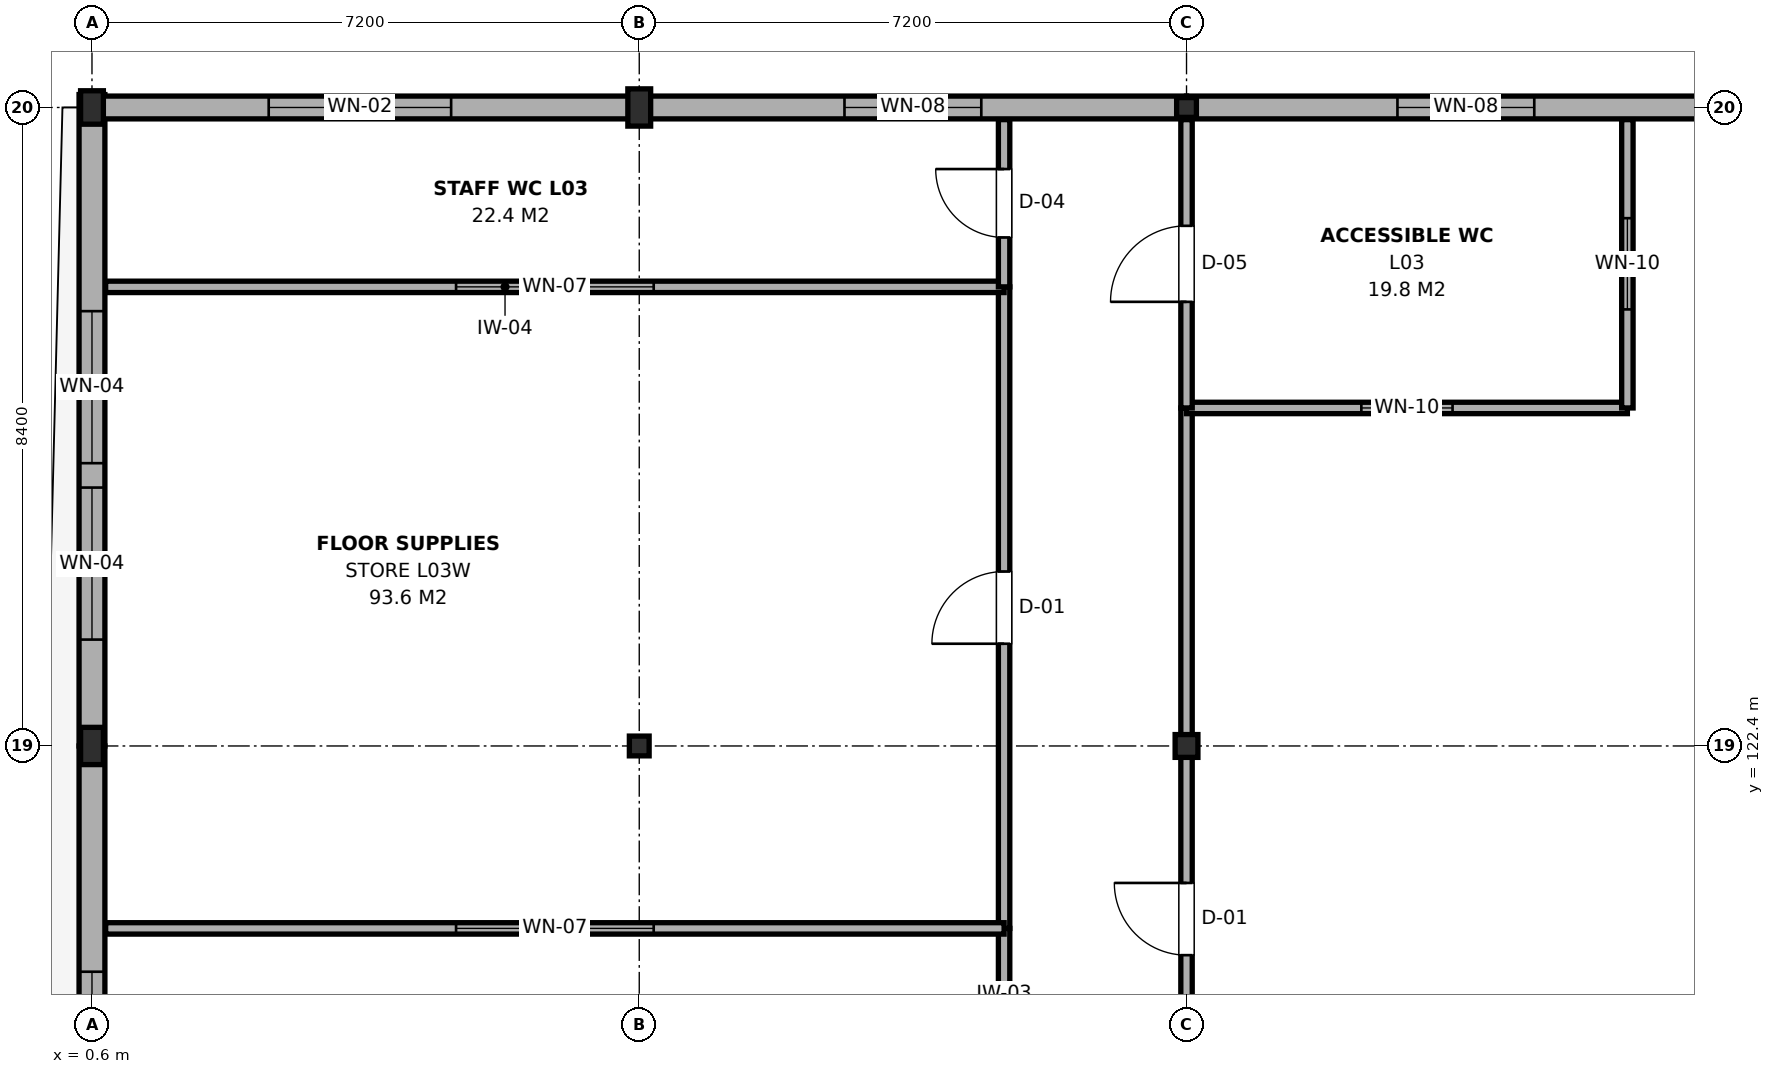
"""IFC4 building model, lengths in metres.
Left out: names, types, materials, properties, quantities, classifications, styles, units other than length and angle.
Written with IfcOpenShell. Run it as: python <this file> out.ifc"""

import sys

from ifc_helpers import new_model, si_unit, direction, frame, frame_2d, origin, origin_2d, place, context, subcontext, project, spatial, rectangle, i_section, extrude, element, fill, save


model = new_model("IFC4")
c1 = context("Model", 3, precision=1e-05, world=origin(), true_north=direction((0.0, 1.0)))
c2 = subcontext(c1, "Body", "Model", "MODEL_VIEW")
j1 = project(units=[si_unit("LENGTHUNIT", "METRE"), si_unit("PLANEANGLEUNIT", "RADIAN")], contexts=[c1])
p1 = place(None, origin())
s1 = spatial("IfcSite", under=j1, at=p1, CompositionType="ELEMENT")
p2 = place(p1, origin())
s2 = spatial("IfcBuilding", under=s1, at=p2, CompositionType="ELEMENT")
p3 = place(p2, frame((0.0, 0.0, 13.2)))
s3 = spatial("IfcBuildingStorey", under=s2, at=p3, CompositionType="ELEMENT", Elevation=13.2)
p4 = place(p3, frame((0.6, 122.4, 0.0), z_axis=(0.0, 0.0, 1.0), x_axis=(1.0, 0.0, 0.0)))
e1 = element("IfcColumn", 1, at=p4, inside=s3, PredefinedType="COLUMN", context=c2, shape_type="SweptSolid", body=[
    extrude(i_section(OverallWidth=0.3, OverallDepth=0.49, WebThickness=0.012, FlangeThickness=0.023, FilletRadius=0.027, at=origin_2d()), origin(), (0.0, 0.0, 1.0), 3.9),
])
p5 = place(p3, frame((0.6, 130.8, 0.0), z_axis=(0.0, 0.0, 1.0), x_axis=(1.0, 0.0, 0.0)))
e2 = element("IfcColumn", 2, at=p5, inside=s3, PredefinedType="COLUMN", context=c2, shape_type="SweptSolid", body=[
    extrude(i_section(OverallWidth=0.3, OverallDepth=0.44, WebThickness=0.011, FlangeThickness=0.021, FilletRadius=0.027, at=origin_2d()), origin(), (0.0, 0.0, 1.0), 3.9),
])
p6 = place(p3, frame((7.8, 122.4, 0.0), z_axis=(0.0, 0.0, 1.0), x_axis=(1.0, 0.0, 0.0)))
e3 = element("IfcColumn", 3, at=p6, inside=s3, PredefinedType="COLUMN", context=c2, shape_type="SweptSolid", body=[
    extrude(i_section(OverallWidth=0.26, OverallDepth=0.26, WebThickness=0.01, FlangeThickness=0.018, FilletRadius=0.024, at=origin_2d()), origin(), (0.0, 0.0, 1.0), 3.9),
])
p7 = place(p3, frame((7.8, 130.8, 0.0), z_axis=(0.0, 0.0, 1.0), x_axis=(1.0, 0.0, 0.0)))
e4 = element("IfcColumn", 4, at=p7, inside=s3, PredefinedType="COLUMN", context=c2, shape_type="SweptSolid", body=[
    extrude(i_section(OverallWidth=0.3, OverallDepth=0.49, WebThickness=0.012, FlangeThickness=0.023, FilletRadius=0.027, at=origin_2d()), origin(), (0.0, 0.0, 1.0), 3.9),
])
p8 = place(p3, frame((15.0, 122.4, 0.0), z_axis=(0.0, 0.0, 1.0), x_axis=(1.0, 0.0, 0.0)))
e5 = element("IfcColumn", 5, at=p8, inside=s3, PredefinedType="COLUMN", context=c2, shape_type="SweptSolid", body=[
    extrude(i_section(OverallWidth=0.3, OverallDepth=0.3, WebThickness=0.011, FlangeThickness=0.019, FilletRadius=0.027, at=origin_2d()), origin(), (0.0, 0.0, 1.0), 3.9),
])
p9 = place(p3, frame((15.0, 130.8, 0.0), z_axis=(0.0, 0.0, 1.0), x_axis=(1.0, 0.0, 0.0)))
e6 = element("IfcColumn", 6, at=p9, inside=s3, PredefinedType="COLUMN", context=c2, shape_type="SweptSolid", body=[
    extrude(i_section(OverallWidth=0.26, OverallDepth=0.26, WebThickness=0.01, FlangeThickness=0.018, FilletRadius=0.024, at=origin_2d()), origin(), (0.0, 0.0, 1.0), 3.9),
])
p10 = place(p3, frame((0.6, 113.4, 0.0), z_axis=(0.0, 0.0, 1.0), x_axis=(0.0, 1.0, 0.0)))
e7 = element("IfcWall", 7, at=p10, inside=s3, PredefinedType="SOLIDWALL", context=c2, shape_type="SweptSolid", body=[
    extrude(rectangle(XDim=9.0, YDim=0.34, at=frame_2d((4.5, 0.0))), origin(), (0.0, 0.0, 1.0), 3.105),
])
p11 = place(p10, frame((1.52, 0.0, 0.9)))
e8 = element("IfcOpeningElement", 8, at=p11, cuts=e7, PredefinedType="OPENING", context=c2, shape_type="SweptSolid", body=[
    extrude(rectangle(XDim=2.0, YDim=1.8, at=frame_2d((1.0, 0.9))), frame((0.0, 0.185, 0.0), z_axis=(0.0, -1.0, 0.0), x_axis=(1.0, 0.0, 0.0)), (0.0, 0.0, 1.0), 0.37),
])
p12 = place(p10, frame((4.03, 0.0, 0.9)))
e9 = element("IfcOpeningElement", 9, at=p12, cuts=e7, PredefinedType="OPENING", context=c2, shape_type="SweptSolid", body=[
    extrude(rectangle(XDim=2.0, YDim=1.8, at=frame_2d((1.0, 0.9))), frame((0.0, 0.185, 0.0), z_axis=(0.0, -1.0, 0.0), x_axis=(1.0, 0.0, 0.0)), (0.0, 0.0, 1.0), 0.37),
])
p13 = place(p3, frame((0.6, 122.4, 0.0), z_axis=(0.0, 0.0, 1.0), x_axis=(0.0, 1.0, 0.0)))
e10 = element("IfcWall", 10, at=p13, inside=s3, PredefinedType="SOLIDWALL", context=c2, shape_type="SweptSolid", body=[
    extrude(rectangle(XDim=8.57, YDim=0.34, at=frame_2d((4.285, 0.0))), origin(), (0.0, 0.0, 1.0), 3.105),
])
p14 = place(p13, frame((1.4, 0.0, 0.9)))
e11 = element("IfcOpeningElement", 11, at=p14, cuts=e10, PredefinedType="OPENING", context=c2, shape_type="SweptSolid", body=[
    extrude(rectangle(XDim=2.0, YDim=1.8, at=frame_2d((1.0, 0.9))), frame((0.0, 0.185, 0.0), z_axis=(0.0, -1.0, 0.0), x_axis=(1.0, 0.0, 0.0)), (0.0, 0.0, 1.0), 0.37),
])
p15 = place(p13, frame((3.72, 0.0, 0.9)))
e12 = element("IfcOpeningElement", 12, at=p15, cuts=e10, PredefinedType="OPENING", context=c2, shape_type="SweptSolid", body=[
    extrude(rectangle(XDim=2.0, YDim=1.8, at=frame_2d((1.0, 0.9))), frame((0.0, 0.185, 0.0), z_axis=(0.0, -1.0, 0.0), x_axis=(1.0, 0.0, 0.0)), (0.0, 0.0, 1.0), 0.37),
])
p16 = place(p3, frame((0.45, 130.8, 0.0), z_axis=(0.0, 0.0, 1.0), x_axis=(1.0, 0.0, 0.0)))
e13 = element("IfcWall", 13, at=p16, inside=s3, PredefinedType="SOLIDWALL", context=c2, shape_type="SweptSolid", body=[
    extrude(rectangle(XDim=7.35, YDim=0.3, at=frame_2d((3.675, 0.0))), origin(), (0.0, 0.0, 1.0), 3.345),
])
p17 = place(p16, frame((2.475, 0.0, 0.9)))
e14 = element("IfcOpeningElement", 14, at=p17, cuts=e13, PredefinedType="OPENING", context=c2, shape_type="SweptSolid", body=[
    extrude(rectangle(XDim=2.4, YDim=2.1, at=frame_2d((1.2, 1.05))), frame((0.0, 0.165, 0.0), z_axis=(0.0, -1.0, 0.0), x_axis=(1.0, 0.0, 0.0)), (0.0, 0.0, 1.0), 0.33),
])
p18 = place(p3, frame((7.8, 130.8, 0.0), z_axis=(0.0, 0.0, 1.0), x_axis=(1.0, 0.0, 0.0)))
e15 = element("IfcWall", 15, at=p18, inside=s3, PredefinedType="SOLIDWALL", context=c2, shape_type="SweptSolid", body=[
    extrude(rectangle(XDim=7.2, YDim=0.3, at=frame_2d((3.6, 0.0))), origin(), (0.0, 0.0, 1.0), 3.095),
])
p19 = place(p18, frame((2.7, 0.0, 0.65)))
e16 = element("IfcOpeningElement", 16, at=p19, cuts=e15, PredefinedType="OPENING", context=c2, shape_type="SweptSolid", body=[
    extrude(rectangle(XDim=1.8, YDim=1.2, at=frame_2d((0.9, 0.6))), frame((0.0, 0.165, 0.0), z_axis=(0.0, -1.0, 0.0), x_axis=(1.0, 0.0, 0.0)), (0.0, 0.0, 1.0), 0.33),
])
p20 = place(p3, frame((15.0, 130.8, 0.0), z_axis=(0.0, 0.0, 1.0), x_axis=(1.0, 0.0, 0.0)))
e17 = element("IfcWall", 17, at=p20, inside=s3, PredefinedType="SOLIDWALL", context=c2, shape_type="SweptSolid", body=[
    extrude(rectangle(XDim=7.35, YDim=0.3, at=frame_2d((3.675, 0.0))), origin(), (0.0, 0.0, 1.0), 3.095),
])
p21 = place(p20, frame((2.775, 0.0, 0.65)))
e18 = element("IfcOpeningElement", 18, at=p21, cuts=e17, PredefinedType="OPENING", context=c2, shape_type="SweptSolid", body=[
    extrude(rectangle(XDim=1.8, YDim=1.2, at=frame_2d((0.9, 0.6))), frame((0.0, 0.165, 0.0), z_axis=(0.0, -1.0, 0.0), x_axis=(1.0, 0.0, 0.0)), (0.0, 0.0, 1.0), 0.33),
])
p22 = place(p3, frame((12.6, 108.0, 0.0), z_axis=(0.0, 0.0, 1.0), x_axis=(0.0, 1.0, 0.0)))
e19 = element("IfcWall", 19, at=p22, inside=s3, PredefinedType="PARTITIONING", context=c2, shape_type="SweptSolid", body=[
    extrude(rectangle(XDim=12.0, YDim=0.15, at=frame_2d((6.0, 0.0))), origin(), (0.0, 0.0, 1.0), 3.145),
])
p23 = place(p22, frame((5.475, 0.0, 0.0)))
e20 = element("IfcOpeningElement", 20, at=p23, cuts=e19, PredefinedType="OPENING", context=c2, shape_type="SweptSolid", body=[
    extrude(rectangle(XDim=1.05, YDim=2.15, at=frame_2d((0.525, 1.075))), frame((0.0, 0.09, 0.0), z_axis=(0.0, -1.0, 0.0), x_axis=(1.0, 0.0, 0.0)), (0.0, 0.0, 1.0), 0.18),
])
p24 = place(p22, frame((7.34, 0.0, 0.95)))
e21 = element("IfcOpeningElement", 21, at=p24, cuts=e19, PredefinedType="OPENING", context=c2, shape_type="SweptSolid", body=[
    extrude(rectangle(XDim=2.6, YDim=1.5, at=frame_2d((1.3, 0.75))), frame((0.0, 0.09, 0.0), z_axis=(0.0, -1.0, 0.0), x_axis=(1.0, 0.0, 0.0)), (0.0, 0.0, 1.0), 0.18),
])
p25 = place(p3, frame((12.6, 120.0, 0.0), z_axis=(0.0, 0.0, 1.0), x_axis=(0.0, 1.0, 0.0)))
e22 = element("IfcWall", 22, at=p25, inside=s3, PredefinedType="PARTITIONING", context=c2, shape_type="SweptSolid", body=[
    extrude(rectangle(XDim=8.44, YDim=0.15, at=frame_2d((4.22, 0.0))), origin(), (0.0, 0.0, 1.0), 3.345),
])
p26 = place(p25, frame((3.745, 0.0, 0.0)))
e23 = element("IfcOpeningElement", 23, at=p26, cuts=e22, PredefinedType="OPENING", context=c2, shape_type="SweptSolid", body=[
    extrude(rectangle(XDim=0.95, YDim=2.15, at=frame_2d((0.475, 1.075))), frame((0.0, 0.09, 0.0), z_axis=(0.0, -1.0, 0.0), x_axis=(1.0, 0.0, 0.0)), (0.0, 0.0, 1.0), 0.18),
])
p27 = place(p3, frame((0.78, 128.44, 0.0), z_axis=(0.0, 0.0, 1.0), x_axis=(1.0, 0.0, 0.0)))
e24 = element("IfcWall", 24, at=p27, inside=s3, PredefinedType="PARTITIONING", context=c2, shape_type="SweptSolid", body=[
    extrude(rectangle(XDim=11.82, YDim=0.15, at=frame_2d((5.91, 0.0))), origin(), (0.0, 0.0, 1.0), 3.105),
])
p28 = place(p27, frame((4.61, 0.0, 0.95)))
e25 = element("IfcOpeningElement", 25, at=p28, cuts=e24, PredefinedType="OPENING", context=c2, shape_type="SweptSolid", body=[
    extrude(rectangle(XDim=2.6, YDim=1.5, at=frame_2d((1.3, 0.75))), frame((0.0, 0.09, 0.0), z_axis=(0.0, -1.0, 0.0), x_axis=(1.0, 0.0, 0.0)), (0.0, 0.0, 1.0), 0.18),
])
p29 = place(p3, frame((12.6, 128.44, 0.0), z_axis=(0.0, 0.0, 1.0), x_axis=(0.0, 1.0, 0.0)))
e26 = element("IfcWall", 26, at=p29, inside=s3, PredefinedType="PARTITIONING", context=c2, shape_type="SweptSolid", body=[
    extrude(rectangle(XDim=2.2, YDim=0.15, at=frame_2d((1.1, 0.0))), origin(), (0.0, 0.0, 1.0), 3.365),
])
p30 = place(p29, frame((0.65, 0.0, 0.0)))
e27 = element("IfcOpeningElement", 27, at=p30, cuts=e26, PredefinedType="OPENING", context=c2, shape_type="SweptSolid", body=[
    extrude(rectangle(XDim=0.9, YDim=2.15, at=frame_2d((0.45, 1.075))), frame((0.0, 0.09, 0.0), z_axis=(0.0, -1.0, 0.0), x_axis=(1.0, 0.0, 0.0)), (0.0, 0.0, 1.0), 0.18),
])
p31 = place(p3, frame((0.78, 120.0, 0.0), z_axis=(0.0, 0.0, 1.0), x_axis=(1.0, 0.0, 0.0)))
e28 = element("IfcWall", 28, at=p31, inside=s3, PredefinedType="PARTITIONING", context=c2, shape_type="SweptSolid", body=[
    extrude(rectangle(XDim=11.82, YDim=0.15, at=frame_2d((5.91, 0.0))), origin(), (0.0, 0.0, 1.0), 3.255),
])
p32 = place(p31, frame((4.61, 0.0, 0.95)))
e29 = element("IfcOpeningElement", 29, at=p32, cuts=e28, PredefinedType="OPENING", context=c2, shape_type="SweptSolid", body=[
    extrude(rectangle(XDim=2.6, YDim=1.5, at=frame_2d((1.3, 0.75))), frame((0.0, 0.09, 0.0), z_axis=(0.0, -1.0, 0.0), x_axis=(1.0, 0.0, 0.0)), (0.0, 0.0, 1.0), 0.18),
])
p33 = place(p3, frame((15.0, 113.4, 0.0), z_axis=(0.0, 0.0, 1.0), x_axis=(0.0, 1.0, 0.0)))
e30 = element("IfcWall", 30, at=p33, inside=s3, PredefinedType="PARTITIONING", context=c2, shape_type="SweptSolid", body=[
    extrude(rectangle(XDim=13.447, YDim=0.15, at=frame_2d((6.724, 0.0))), origin(), (0.0, 0.0, 1.0), 3.105),
])
p34 = place(p33, frame((6.248, 0.0, 0.0)))
e31 = element("IfcOpeningElement", 31, at=p34, cuts=e30, PredefinedType="OPENING", context=c2, shape_type="SweptSolid", body=[
    extrude(rectangle(XDim=0.95, YDim=2.15, at=frame_2d((0.475, 1.075))), frame((0.0, 0.09, 0.0), z_axis=(0.0, -1.0, 0.0), x_axis=(1.0, 0.0, 0.0)), (0.0, 0.0, 1.0), 0.18),
])
p35 = place(p3, frame((15.0, 126.847, 0.0), z_axis=(0.0, 0.0, 1.0), x_axis=(1.0, 0.0, 0.0)))
e32 = element("IfcWall", 32, at=p35, inside=s3, PredefinedType="PARTITIONING", context=c2, shape_type="SweptSolid", body=[
    extrude(rectangle(XDim=5.8, YDim=0.15, at=frame_2d((2.9, 0.0))), origin(), (0.0, 0.0, 1.0), 3.205),
])
p36 = place(p35, frame((2.3, 0.0, 0.95)))
e33 = element("IfcOpeningElement", 33, at=p36, cuts=e32, PredefinedType="OPENING", context=c2, shape_type="SweptSolid", body=[
    extrude(rectangle(XDim=1.2, YDim=1.5, at=frame_2d((0.6, 0.75))), frame((0.0, 0.09, 0.0), z_axis=(0.0, -1.0, 0.0), x_axis=(1.0, 0.0, 0.0)), (0.0, 0.0, 1.0), 0.18),
])
p37 = place(p3, frame((20.8, 126.847, 0.0), z_axis=(0.0, 0.0, 1.0), x_axis=(0.0, 1.0, 0.0)))
e34 = element("IfcWall", 34, at=p37, inside=s3, PredefinedType="PARTITIONING", context=c2, shape_type="SweptSolid", body=[
    extrude(rectangle(XDim=3.793, YDim=0.15, at=frame_2d((1.896, 0.0))), origin(), (0.0, 0.0, 1.0), 3.095),
])
p38 = place(p37, frame((1.296, 0.0, 0.95)))
e35 = element("IfcOpeningElement", 35, at=p38, cuts=e34, PredefinedType="OPENING", context=c2, shape_type="SweptSolid", body=[
    extrude(rectangle(XDim=1.2, YDim=1.5, at=frame_2d((0.6, 0.75))), frame((0.0, 0.09, 0.0), z_axis=(0.0, -1.0, 0.0), x_axis=(1.0, 0.0, 0.0)), (0.0, 0.0, 1.0), 0.18),
])
p39 = place(p3, frame((15.0, 126.847, 0.0), z_axis=(0.0, 0.0, 1.0), x_axis=(0.0, 1.0, 0.0)))
e36 = element("IfcWall", 36, at=p39, inside=s3, PredefinedType="PARTITIONING", context=c2, shape_type="SweptSolid", body=[
    extrude(rectangle(XDim=3.793, YDim=0.15, at=frame_2d((1.896, 0.0))), origin(), (0.0, 0.0, 1.0), 3.095),
])
p40 = place(p39, frame((1.396, 0.0, 0.0)))
e37 = element("IfcOpeningElement", 37, at=p40, cuts=e36, PredefinedType="OPENING", context=c2, shape_type="SweptSolid", body=[
    extrude(rectangle(XDim=1.0, YDim=2.15, at=frame_2d((0.5, 1.075))), frame((0.0, 0.09, 0.0), z_axis=(0.0, -1.0, 0.0), x_axis=(1.0, 0.0, 0.0)), (0.0, 0.0, 1.0), 0.18),
])
p41 = place(p12, origin())
e38 = element("IfcWindow", 38, at=p41, inside=s3, PartitioningType="SINGLE_PANEL", PredefinedType="WINDOW", context=c2, shape_type="SweptSolid", body=[
    extrude(rectangle(XDim=2.0, YDim=1.8, at=frame_2d((1.0, 0.9))), frame((0.0, 0.03, 0.0), z_axis=(0.0, -1.0, 0.0), x_axis=(1.0, 0.0, 0.0)), (0.0, 0.0, 1.0), 0.06),
])
fill(e9, e38)
p42 = place(p14, origin())
e39 = element("IfcWindow", 39, at=p42, inside=s3, PartitioningType="SINGLE_PANEL", PredefinedType="WINDOW", context=c2, shape_type="SweptSolid", body=[
    extrude(rectangle(XDim=2.0, YDim=1.8, at=frame_2d((1.0, 0.9))), frame((0.0, 0.03, 0.0), z_axis=(0.0, -1.0, 0.0), x_axis=(1.0, 0.0, 0.0)), (0.0, 0.0, 1.0), 0.06),
])
fill(e11, e39)
p43 = place(p15, origin())
e40 = element("IfcWindow", 40, at=p43, inside=s3, PartitioningType="SINGLE_PANEL", PredefinedType="WINDOW", context=c2, shape_type="SweptSolid", body=[
    extrude(rectangle(XDim=2.0, YDim=1.8, at=frame_2d((1.0, 0.9))), frame((0.0, 0.03, 0.0), z_axis=(0.0, -1.0, 0.0), x_axis=(1.0, 0.0, 0.0)), (0.0, 0.0, 1.0), 0.06),
])
fill(e12, e40)
p44 = place(p17, origin())
e41 = element("IfcWindow", 41, at=p44, inside=s3, PartitioningType="SINGLE_PANEL", PredefinedType="WINDOW", context=c2, shape_type="SweptSolid", body=[
    extrude(rectangle(XDim=2.4, YDim=2.1, at=frame_2d((1.2, 1.05))), frame((0.0, 0.03, 0.0), z_axis=(0.0, -1.0, 0.0), x_axis=(1.0, 0.0, 0.0)), (0.0, 0.0, 1.0), 0.06),
])
fill(e14, e41)
p45 = place(p19, origin())
e42 = element("IfcWindow", 42, at=p45, inside=s3, PartitioningType="SINGLE_PANEL", PredefinedType="WINDOW", context=c2, shape_type="SweptSolid", body=[
    extrude(rectangle(XDim=1.8, YDim=1.2, at=frame_2d((0.9, 0.6))), frame((0.0, 0.03, 0.0), z_axis=(0.0, -1.0, 0.0), x_axis=(1.0, 0.0, 0.0)), (0.0, 0.0, 1.0), 0.06),
])
fill(e16, e42)
p46 = place(p21, origin())
e43 = element("IfcWindow", 43, at=p46, inside=s3, PartitioningType="SINGLE_PANEL", PredefinedType="WINDOW", context=c2, shape_type="SweptSolid", body=[
    extrude(rectangle(XDim=1.8, YDim=1.2, at=frame_2d((0.9, 0.6))), frame((0.0, 0.03, 0.0), z_axis=(0.0, -1.0, 0.0), x_axis=(1.0, 0.0, 0.0)), (0.0, 0.0, 1.0), 0.06),
])
fill(e18, e43)
p47 = place(p26, origin())
e44 = element("IfcDoor", 44, at=p47, inside=s3, OperationType="SINGLE_SWING_LEFT", PredefinedType="DOOR", context=c2, shape_type="SweptSolid", body=[
    extrude(rectangle(XDim=0.95, YDim=2.15, at=frame_2d((0.475, 1.075))), frame((0.0, 0.025, 0.0), z_axis=(0.0, -1.0, 0.0), x_axis=(1.0, 0.0, 0.0)), (0.0, 0.0, 1.0), 0.05),
])
fill(e23, e44)
p48 = place(p28, origin())
e45 = element("IfcWindow", 45, at=p48, inside=s3, PartitioningType="SINGLE_PANEL", PredefinedType="WINDOW", context=c2, shape_type="SweptSolid", body=[
    extrude(rectangle(XDim=2.6, YDim=1.5, at=frame_2d((1.3, 0.75))), frame((0.0, 0.03, 0.0), z_axis=(0.0, -1.0, 0.0), x_axis=(1.0, 0.0, 0.0)), (0.0, 0.0, 1.0), 0.06),
])
fill(e25, e45)
p49 = place(p30, origin())
e46 = element("IfcDoor", 46, at=p49, inside=s3, OperationType="SINGLE_SWING_RIGHT", PredefinedType="DOOR", context=c2, shape_type="SweptSolid", body=[
    extrude(rectangle(XDim=0.9, YDim=2.15, at=frame_2d((0.45, 1.075))), frame((0.0, 0.025, 0.0), z_axis=(0.0, -1.0, 0.0), x_axis=(1.0, 0.0, 0.0)), (0.0, 0.0, 1.0), 0.05),
])
fill(e27, e46)
p50 = place(p32, origin())
e47 = element("IfcWindow", 47, at=p50, inside=s3, PartitioningType="SINGLE_PANEL", PredefinedType="WINDOW", context=c2, shape_type="SweptSolid", body=[
    extrude(rectangle(XDim=2.6, YDim=1.5, at=frame_2d((1.3, 0.75))), frame((0.0, 0.03, 0.0), z_axis=(0.0, -1.0, 0.0), x_axis=(1.0, 0.0, 0.0)), (0.0, 0.0, 1.0), 0.06),
])
fill(e29, e47)
p51 = place(p34, origin())
e48 = element("IfcDoor", 48, at=p51, inside=s3, OperationType="SINGLE_SWING_RIGHT", PredefinedType="DOOR", context=c2, shape_type="SweptSolid", body=[
    extrude(rectangle(XDim=0.95, YDim=2.15, at=frame_2d((0.475, 1.075))), frame((0.0, 0.025, 0.0), z_axis=(0.0, -1.0, 0.0), x_axis=(1.0, 0.0, 0.0)), (0.0, 0.0, 1.0), 0.05),
])
fill(e31, e48)
p52 = place(p36, origin())
e49 = element("IfcWindow", 49, at=p52, inside=s3, PartitioningType="SINGLE_PANEL", PredefinedType="WINDOW", context=c2, shape_type="SweptSolid", body=[
    extrude(rectangle(XDim=1.2, YDim=1.5, at=frame_2d((0.6, 0.75))), frame((0.0, 0.03, 0.0), z_axis=(0.0, -1.0, 0.0), x_axis=(1.0, 0.0, 0.0)), (0.0, 0.0, 1.0), 0.06),
])
fill(e33, e49)
p53 = place(p38, origin())
e50 = element("IfcWindow", 50, at=p53, inside=s3, PartitioningType="SINGLE_PANEL", PredefinedType="WINDOW", context=c2, shape_type="SweptSolid", body=[
    extrude(rectangle(XDim=1.2, YDim=1.5, at=frame_2d((0.6, 0.75))), frame((0.0, 0.03, 0.0), z_axis=(0.0, -1.0, 0.0), x_axis=(1.0, 0.0, 0.0)), (0.0, 0.0, 1.0), 0.06),
])
fill(e35, e50)
p54 = place(p40, origin())
e51 = element("IfcDoor", 51, at=p54, inside=s3, OperationType="SINGLE_SWING_LEFT", PredefinedType="DOOR", context=c2, shape_type="SweptSolid", body=[
    extrude(rectangle(XDim=1.0, YDim=2.15, at=frame_2d((0.5, 1.075))), frame((0.0, 0.025, 0.0), z_axis=(0.0, -1.0, 0.0), x_axis=(1.0, 0.0, 0.0)), (0.0, 0.0, 1.0), 0.05),
])
fill(e37, e51)
save(model, sys.argv[1])
